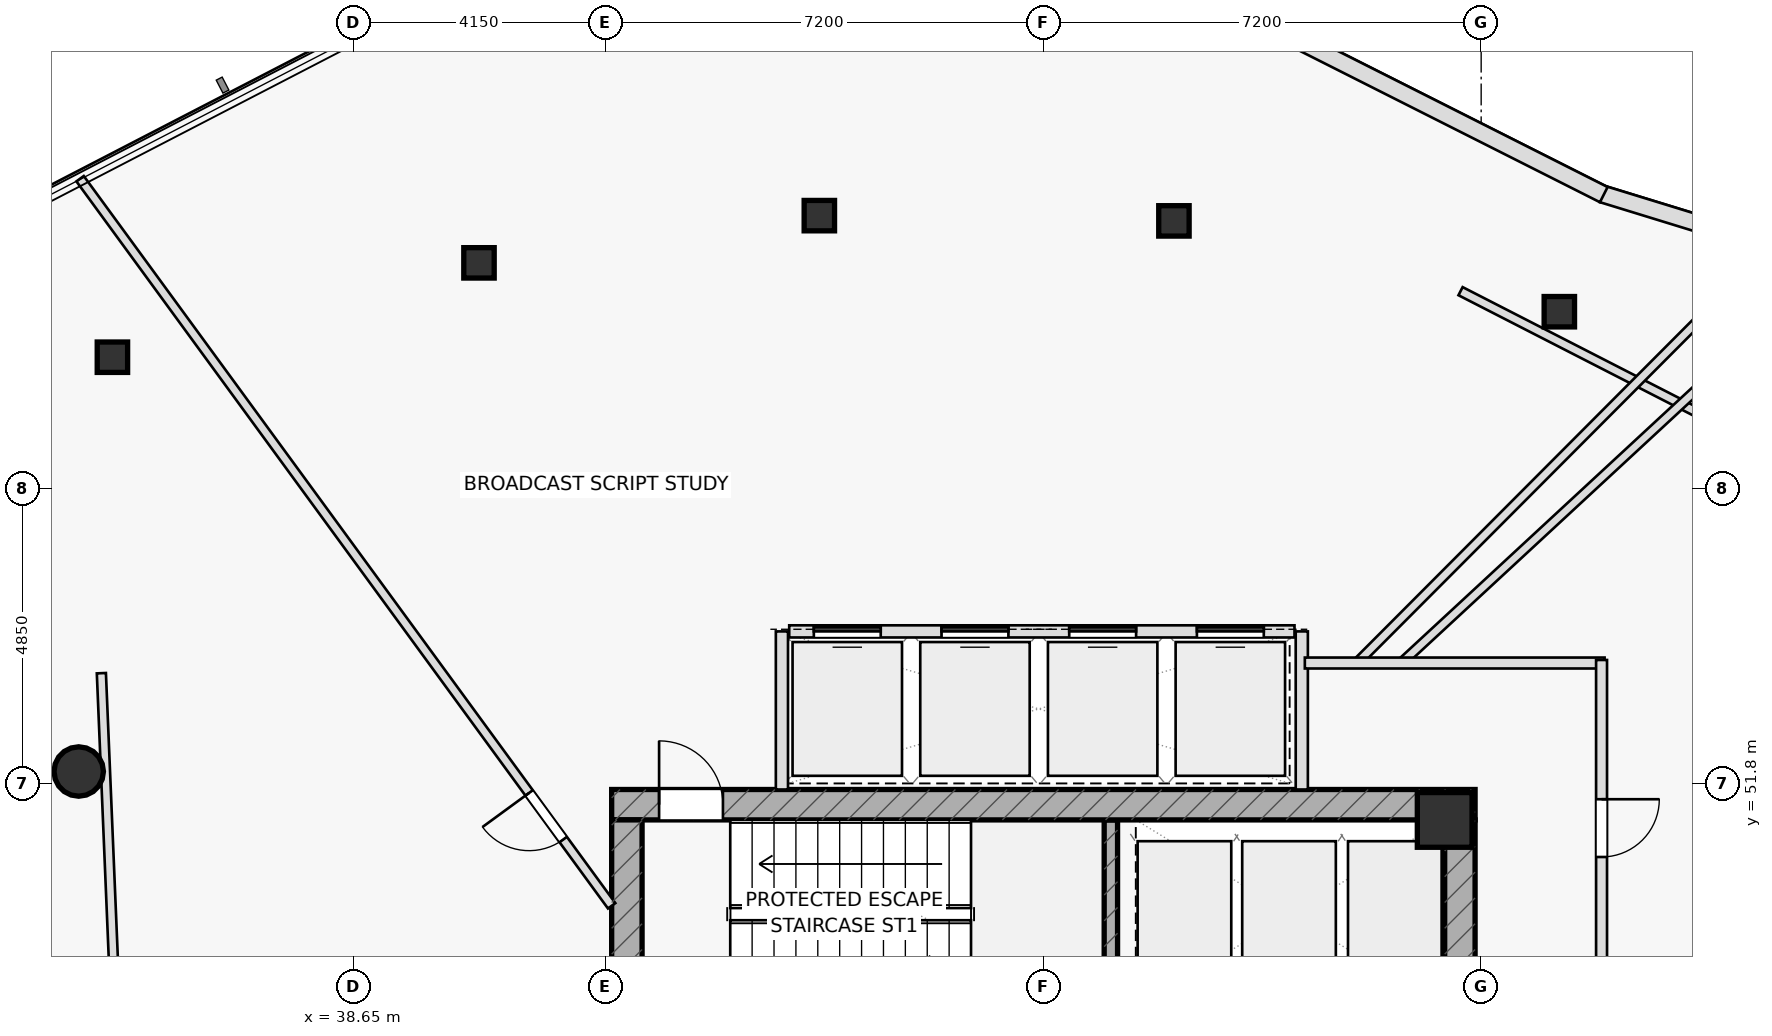
"""IFC4 building model, lengths in metres.
Left out: names, types, materials, properties, quantities, classifications, styles, units other than length and angle.
Written with IfcOpenShell. Run it as: python <this file> out.ifc"""

import sys

from ifc_helpers import new_model, si_unit, direction, frame, frame_2d, origin, origin_2d, place, context, subcontext, project, spatial, rectangle, hollow_rectangle, hollow_circle, extrude, element, fill, save


model = new_model("IFC4")
c1 = context("Model", 3, precision=1e-05, world=origin(), true_north=direction((0.0, 1.0)))
c2 = subcontext(c1, "Body", "Model", "MODEL_VIEW")
j1 = project(units=[si_unit("LENGTHUNIT", "METRE"), si_unit("PLANEANGLEUNIT", "RADIAN")], contexts=[c1])
p1 = place(None, origin())
s1 = spatial("IfcSite", under=j1, at=p1, CompositionType="ELEMENT")
p2 = place(p1, origin())
s2 = spatial("IfcBuilding", under=s1, at=p2, CompositionType="ELEMENT")
p3 = place(p2, frame((0.0, 0.0, 297.5)))
s3 = spatial("IfcBuildingStorey", under=s2, at=p3, CompositionType="ELEMENT", Elevation=297.5)
p4 = place(p3, frame((51.11, 48.1, 0.0), z_axis=(0.0, 0.0, 1.0), x_axis=(0.0, 1.0, 0.0)))
e1 = element("IfcWall", 1, at=p4, inside=s3, PredefinedType="SHEAR", context=c2, shape_type="SweptSolid", body=[
    extrude(rectangle(XDim=3.1, YDim=0.22, at=frame_2d((1.55, 0.0))), origin(), (0.0, 0.0, 1.0), 3.7),
])
p5 = place(p3, frame((42.9, 51.45, 0.0), z_axis=(0.0, 0.0, 1.0), x_axis=(1.0, 0.0, 0.0)))
e2 = element("IfcWall", 2, at=p5, inside=s3, PredefinedType="SHEAR", context=c2, shape_type="SweptSolid", body=[
    extrude(rectangle(XDim=14.2, YDim=0.5, at=frame_2d((7.1, 0.0))), origin(), (0.0, 0.0, 1.0), 3.7),
])
p6 = place(p5, frame((0.78, 0.0, 0.0)))
e3 = element("IfcOpeningElement", 3, at=p6, cuts=e2, PredefinedType="OPENING", context=c2, shape_type="SweptSolid", body=[
    extrude(rectangle(XDim=1.05, YDim=2.2, at=frame_2d((0.525, 1.1))), frame((0.0, 0.26, 0.0), z_axis=(0.0, -1.0, 0.0), x_axis=(1.0, 0.0, 0.0)), (0.0, 0.0, 1.0), 0.52),
])
p7 = place(p3, frame((43.15, 38.8, 0.0), z_axis=(0.0, 0.0, 1.0), x_axis=(0.0, 1.0, 0.0)))
e4 = element("IfcWall", 4, at=p7, inside=s3, PredefinedType="SHEAR", context=c2, shape_type="SweptSolid", body=[
    extrude(rectangle(XDim=12.4, YDim=0.5, at=frame_2d((6.2, 0.0))), origin(), (0.0, 0.0, 1.0), 3.7),
])
p8 = place(p3, frame((56.85, 38.8, 0.0), z_axis=(0.0, 0.0, 1.0), x_axis=(0.0, 1.0, 0.0)))
e5 = element("IfcWall", 5, at=p8, inside=s3, PredefinedType="SHEAR", context=c2, shape_type="SweptSolid", body=[
    extrude(rectangle(XDim=12.4, YDim=0.5, at=frame_2d((6.2, 0.0))), origin(), (0.0, 0.0, 1.0), 3.7),
])
p9 = place(p8, frame((3.85, 0.0, 0.0)))
e6 = element("IfcOpeningElement", 6, at=p9, cuts=e5, PredefinedType="OPENING", context=c2, shape_type="SweptSolid", body=[
    extrude(rectangle(XDim=1.5, YDim=2.2, at=frame_2d((0.75, 1.1))), frame((0.0, 0.26, 0.0), z_axis=(0.0, -1.0, 0.0), x_axis=(1.0, 0.0, 0.0)), (0.0, 0.0, 1.0), 0.52),
])
p10 = place(p3, frame((56.6, 51.2, 0.0), z_axis=(0.0, 0.0, 1.0), x_axis=(1.0, 0.0, 0.0)))
e7 = element("IfcColumn", 7, at=p10, inside=s3, PredefinedType="COLUMN", context=c2, shape_type="SweptSolid", body=[
    extrude(rectangle(XDim=0.9, YDim=0.9, at=origin_2d()), origin(), (0.0, 0.0, 1.0), 3.7),
])
p11 = place(p3, frame((34.135, 51.996, 0.0), z_axis=(0.0, 0.0, 1.0), x_axis=(1.0, 0.0, 0.0)))
e8 = element("IfcColumn", 8, at=p11, inside=s3, PredefinedType="COLUMN", context=c2, shape_type="SweptSolid", body=[
    extrude(hollow_circle(Radius=0.406, WallThickness=0.036, at=origin_2d()), origin(), (0.0, 0.0, 1.0), 3.7),
])
for number, where, z_axis, x_axis in (
    (9, (58.486, 59.557, 0.0), (0.0, 0.0, 1.0), (1.0, 0.0, 0.0)),
    (10, (52.147, 61.051, 0.0), (0.0, 0.0, 1.0), (1.0, 0.0, 0.0)),
    (11, (46.315, 61.137, 0.0), (0.0, 0.0, 1.0), (1.0, 0.0, 0.0)),
    (12, (40.718, 60.361, 0.0), (0.0, 0.0, 1.0), (1.0, 0.0, 0.0)),
    (13, (34.689, 58.809, 0.0), (0.0, 0.0, 1.0), (1.0, 0.0, 0.0)),
):
    element("IfcColumn", number, at=place(p3, frame(where, z_axis=z_axis, x_axis=x_axis)), inside=s3, PredefinedType="COLUMN", context=c2, shape_type="SweptSolid", body=[
        extrude(hollow_rectangle(XDim=0.5, YDim=0.5, WallThickness=0.03, at=origin_2d()), origin(), (0.0, 0.0, 1.0), 3.7),
    ])
for number, where, z_axis, x_axis in (
    (14, (45.7, 51.7, 0.0), (0.0, 0.0, 1.0), (0.0, 1.0, 0.0)),
    (15, (54.25, 51.7, 0.0), (0.0, 0.0, 1.0), (0.0, 1.0, 0.0)),
):
    element("IfcWall", number, at=place(p3, frame(where, z_axis=z_axis, x_axis=x_axis)), inside=s3, PredefinedType="PARTITIONING", context=c2, shape_type="SweptSolid", body=[
        extrude(rectangle(XDim=2.6, YDim=0.2, at=frame_2d((1.3, 0.0))), origin(), (0.0, 0.0, 1.0), 3.7),
    ])
p12 = place(p3, frame((34.507, 53.613, 0.0), z_axis=(0.0, 0.0, 1.0), x_axis=(0.041875090182, -0.999122853718, 0.0)))
e16 = element("IfcWall", 16, at=p12, inside=s3, PredefinedType="PARTITIONING", context=c2, shape_type="SweptSolid", body=[
    extrude(rectangle(XDim=8.139, YDim=0.15, at=frame_2d((4.069, 0.0))), origin(), (0.0, 0.0, 1.0), 3.235),
])
p13 = place(p3, frame((66.543, 54.934, 0.0), z_axis=(0.0, 0.0, 1.0), x_axis=(-0.889966951661, 0.456025026673, 0.0)))
e17 = element("IfcWall", 17, at=p13, inside=s3, PredefinedType="PARTITIONING", context=c2, shape_type="SweptSolid", body=[
    extrude(rectangle(XDim=10.879, YDim=0.15, at=frame_2d((5.439, 0.0))), origin(), (0.0, 0.0, 1.0), 3.235),
])
p14 = place(p3, frame((55.887, 53.78, 0.0), z_axis=(0.0, 0.0, 1.0), x_axis=(0.733901596629, 0.67925580341, 0.0)))
e18 = element("IfcWall", 18, at=p14, inside=s3, PredefinedType="PARTITIONING", context=c2, shape_type="SweptSolid", body=[
    extrude(rectangle(XDim=9.659, YDim=0.15, at=frame_2d((4.83, 0.0))), origin(), (0.0, 0.0, 1.0), 3.175),
])
p15 = place(p3, frame((55.156, 53.78, 0.0), z_axis=(0.0, 0.0, 1.0), x_axis=(0.706148711561, 0.708063554465, 0.0)))
e19 = element("IfcWall", 19, at=p15, inside=s3, PredefinedType="PARTITIONING", context=c2, shape_type="SweptSolid", body=[
    extrude(rectangle(XDim=9.69, YDim=0.15, at=frame_2d((4.845, 0.0))), origin(), (0.0, 0.0, 1.0), 3.175),
])
p16 = place(p3, frame((42.9, 49.787, 0.0), z_axis=(0.0, 0.0, 1.0), x_axis=(-0.590195506102, 0.80726034498, 0.0)))
e20 = element("IfcWall", 20, at=p16, inside=s3, PredefinedType="PARTITIONING", context=c2, shape_type="SweptSolid", body=[
    extrude(rectangle(XDim=14.813, YDim=0.15, at=frame_2d((7.406, 0.0))), origin(), (0.0, 0.0, 1.0), 3.175),
])
p17 = place(p16, frame((1.35, 0.0, 0.0)))
e21 = element("IfcOpeningElement", 21, at=p17, cuts=e20, PredefinedType="OPENING", context=c2, shape_type="SweptSolid", body=[
    extrude(rectangle(XDim=0.95, YDim=2.05, at=frame_2d((0.475, 1.025))), frame((0.0, 0.085, 0.0), z_axis=(0.0, -1.0, 0.0), x_axis=(1.0, 0.0, 0.0)), (0.0, 0.0, 1.0), 0.17),
])
p18 = place(p3, frame((54.3, 53.78, 0.0), z_axis=(0.0, 0.0, 1.0), x_axis=(1.0, 0.0, 0.0)))
e22 = element("IfcWall", 22, at=p18, inside=s3, PredefinedType="PARTITIONING", context=c2, shape_type="SweptSolid", body=[
    extrude(rectangle(XDim=4.93, YDim=0.18, at=frame_2d((2.465, 0.0))), origin(), (0.0, 0.0, 1.0), 3.7),
])
p19 = place(p3, frame((59.18, 53.83, 0.0), z_axis=(0.0, 0.0, 1.0), x_axis=(0.0, -1.0, 0.0)))
e23 = element("IfcWall", 23, at=p19, inside=s3, PredefinedType="PARTITIONING", context=c2, shape_type="SweptSolid", body=[
    extrude(rectangle(XDim=5.53, YDim=0.18, at=frame_2d((2.765, 0.0))), origin(), (0.0, 0.0, 1.0), 3.7),
])
p20 = place(p19, frame((2.29, 0.0, 0.0)))
e24 = element("IfcOpeningElement", 24, at=p20, cuts=e23, PredefinedType="OPENING", context=c2, shape_type="SweptSolid", body=[
    extrude(rectangle(XDim=0.95, YDim=2.05, at=frame_2d((0.475, 1.025))), frame((0.0, 0.1, 0.0), z_axis=(0.0, -1.0, 0.0), x_axis=(1.0, 0.0, 0.0)), (0.0, 0.0, 1.0), 0.2),
])
p21 = place(p3, frame((65.465, 59.566, 0.0), z_axis=(0.0, 0.0, 1.0), x_axis=(-0.95591317688, 0.293649447926, 0.0)))
e25 = element("IfcWall", 25, at=p21, inside=s3, PredefinedType="STANDARD", context=c2, shape_type="SweptSolid", body=[
    extrude(rectangle(XDim=6.566, YDim=0.28, at=frame_2d((3.283, 0.0))), origin(), (0.0, 0.0, 1.0), 3.7),
])
p22 = place(p3, frame((59.217, 61.483, 0.0), z_axis=(0.0, 0.0, 1.0), x_axis=(-0.892865197732, 0.450324037422, 0.0)))
e26 = element("IfcWall", 26, at=p22, inside=s3, PredefinedType="STANDARD", context=c2, shape_type="SweptSolid", body=[
    extrude(rectangle(XDim=7.215, YDim=0.28, at=frame_2d((3.607, 0.0))), origin(), (0.0, 0.0, 1.0), 3.7),
])
p23 = place(p3, frame((45.82, 54.3, 0.0), z_axis=(0.0, 0.0, 1.0), x_axis=(1.0, 0.0, 0.0)))
e27 = element("IfcWall", 27, at=p23, inside=s3, PredefinedType="PARTITIONING", context=c2, shape_type="SweptSolid", body=[
    extrude(rectangle(XDim=8.31, YDim=0.2, at=frame_2d((4.155, 0.0))), origin(), (0.0, 0.0, 1.0), 3.7),
])
p24 = place(p23, frame((0.405, 0.0, 0.0)))
e28 = element("IfcOpeningElement", 28, at=p24, cuts=e27, PredefinedType="OPENING", context=c2, shape_type="SweptSolid", body=[
    extrude(rectangle(XDim=1.1, YDim=2.15, at=frame_2d((0.55, 1.075))), frame((0.0, 0.11, 0.0), z_axis=(0.0, -1.0, 0.0), x_axis=(1.0, 0.0, 0.0)), (0.0, 0.0, 1.0), 0.22),
])
p25 = place(p23, frame((2.505, 0.0, 0.0)))
e29 = element("IfcOpeningElement", 29, at=p25, cuts=e27, PredefinedType="OPENING", context=c2, shape_type="SweptSolid", body=[
    extrude(rectangle(XDim=1.1, YDim=2.15, at=frame_2d((0.55, 1.075))), frame((0.0, 0.11, 0.0), z_axis=(0.0, -1.0, 0.0), x_axis=(1.0, 0.0, 0.0)), (0.0, 0.0, 1.0), 0.22),
])
p26 = place(p23, frame((4.605, 0.0, 0.0)))
e30 = element("IfcOpeningElement", 30, at=p26, cuts=e27, PredefinedType="OPENING", context=c2, shape_type="SweptSolid", body=[
    extrude(rectangle(XDim=1.1, YDim=2.15, at=frame_2d((0.55, 1.075))), frame((0.0, 0.11, 0.0), z_axis=(0.0, -1.0, 0.0), x_axis=(1.0, 0.0, 0.0)), (0.0, 0.0, 1.0), 0.22),
])
p27 = place(p23, frame((6.705, 0.0, 0.0)))
e31 = element("IfcOpeningElement", 31, at=p27, cuts=e27, PredefinedType="OPENING", context=c2, shape_type="SweptSolid", body=[
    extrude(rectangle(XDim=1.1, YDim=2.15, at=frame_2d((0.55, 1.075))), frame((0.0, 0.11, 0.0), z_axis=(0.0, -1.0, 0.0), x_axis=(1.0, 0.0, 0.0)), (0.0, 0.0, 1.0), 0.22),
])
p28 = place(p6, origin())
e32 = element("IfcDoor", 32, at=p28, inside=s3, OperationType="SINGLE_SWING_LEFT", PredefinedType="DOOR", context=c2, shape_type="SweptSolid", body=[
    extrude(rectangle(XDim=1.05, YDim=2.2, at=frame_2d((0.525, 1.1))), frame((0.0, 0.025, 0.0), z_axis=(0.0, -1.0, 0.0), x_axis=(1.0, 0.0, 0.0)), (0.0, 0.0, 1.0), 0.05),
])
fill(e3, e32)
p29 = place(p17, origin())
e33 = element("IfcDoor", 33, at=p29, inside=s3, OperationType="SINGLE_SWING_RIGHT", PredefinedType="DOOR", context=c2, shape_type="SweptSolid", body=[
    extrude(rectangle(XDim=0.95, YDim=2.05, at=frame_2d((0.475, 1.025))), frame((0.0, 0.025, 0.0), z_axis=(0.0, -1.0, 0.0), x_axis=(1.0, 0.0, 0.0)), (0.0, 0.0, 1.0), 0.05),
])
fill(e21, e33)
p30 = place(p20, origin())
e34 = element("IfcDoor", 34, at=p30, inside=s3, OperationType="SINGLE_SWING_LEFT", PredefinedType="DOOR", context=c2, shape_type="SweptSolid", body=[
    extrude(rectangle(XDim=0.95, YDim=2.05, at=frame_2d((0.475, 1.025))), frame((0.0, 0.025, 0.0), z_axis=(0.0, -1.0, 0.0), x_axis=(1.0, 0.0, 0.0)), (0.0, 0.0, 1.0), 0.05),
])
fill(e24, e34)
p31 = place(p24, origin())
e35 = element("IfcDoor", 35, at=p31, inside=s3, OperationType="SLIDING_TO_LEFT", PredefinedType="DOOR", context=c2, shape_type="SweptSolid", body=[
    extrude(rectangle(XDim=1.1, YDim=2.15, at=frame_2d((0.55, 1.075))), frame((0.0, 0.025, 0.0), z_axis=(0.0, -1.0, 0.0), x_axis=(1.0, 0.0, 0.0)), (0.0, 0.0, 1.0), 0.05),
])
fill(e28, e35)
p32 = place(p25, origin())
e36 = element("IfcDoor", 36, at=p32, inside=s3, OperationType="SLIDING_TO_RIGHT", PredefinedType="DOOR", context=c2, shape_type="SweptSolid", body=[
    extrude(rectangle(XDim=1.1, YDim=2.15, at=frame_2d((0.55, 1.075))), frame((0.0, 0.025, 0.0), z_axis=(0.0, -1.0, 0.0), x_axis=(1.0, 0.0, 0.0)), (0.0, 0.0, 1.0), 0.05),
])
fill(e29, e36)
p33 = place(p26, origin())
e37 = element("IfcDoor", 37, at=p33, inside=s3, OperationType="SLIDING_TO_LEFT", PredefinedType="DOOR", context=c2, shape_type="SweptSolid", body=[
    extrude(rectangle(XDim=1.1, YDim=2.15, at=frame_2d((0.55, 1.075))), frame((0.0, 0.025, 0.0), z_axis=(0.0, -1.0, 0.0), x_axis=(1.0, 0.0, 0.0)), (0.0, 0.0, 1.0), 0.05),
])
fill(e30, e37)
p34 = place(p27, origin())
e38 = element("IfcDoor", 38, at=p34, inside=s3, OperationType="SLIDING_TO_RIGHT", PredefinedType="DOOR", context=c2, shape_type="SweptSolid", body=[
    extrude(rectangle(XDim=1.1, YDim=2.15, at=frame_2d((0.55, 1.075))), frame((0.0, 0.025, 0.0), z_axis=(0.0, -1.0, 0.0), x_axis=(1.0, 0.0, 0.0)), (0.0, 0.0, 1.0), 0.05),
])
fill(e31, e38)
save(model, sys.argv[1])
